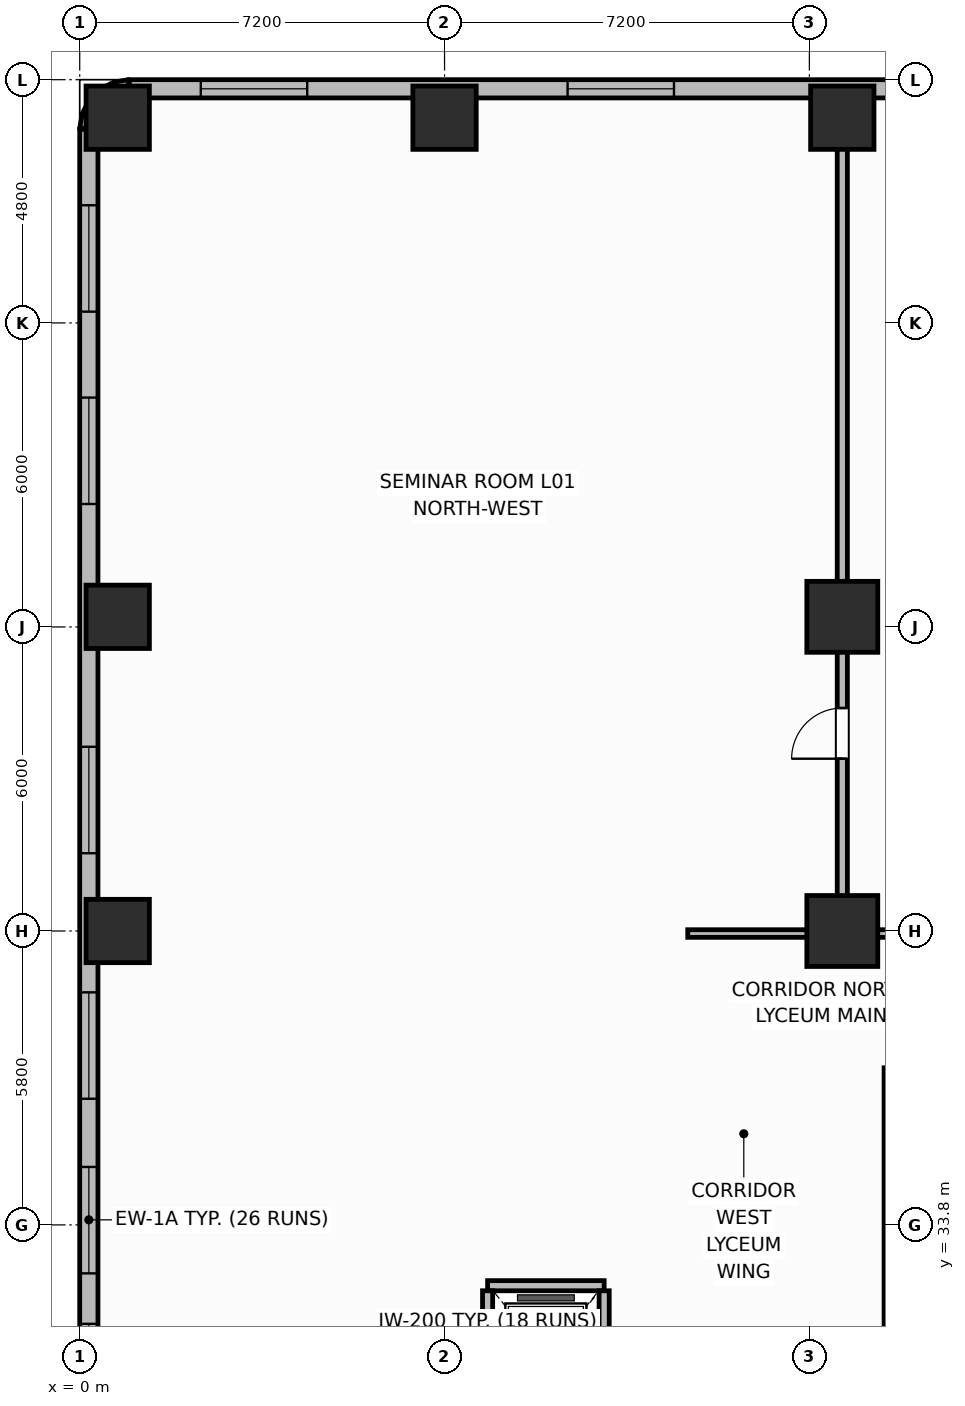
"""IFC4 building model, lengths in metres.
Left out: names, types, materials, properties, quantities, classifications, styles, units other than length and angle.
Written with IfcOpenShell. Run it as: python <this file> out.ifc"""

import sys

from ifc_helpers import new_model, si_unit, direction, frame, frame_2d, origin, origin_2d, place, context, subcontext, project, spatial, rectangle, extrude, element, fill, save


model = new_model("IFC4")
c1 = context("Model", 3, precision=1e-05, world=origin(), true_north=direction((0.0, 1.0)))
c2 = subcontext(c1, "Body", "Model", "MODEL_VIEW")
j1 = project(units=[si_unit("LENGTHUNIT", "METRE"), si_unit("PLANEANGLEUNIT", "RADIAN")], contexts=[c1])
p1 = place(None, origin())
s1 = spatial("IfcSite", under=j1, at=p1, CompositionType="ELEMENT")
p2 = place(p1, origin())
s2 = spatial("IfcBuilding", under=s1, at=p2, CompositionType="ELEMENT")
p3 = place(p2, frame((0.0, 0.0, 6.6)))
s3 = spatial("IfcBuildingStorey", under=s2, at=p3, CompositionType="ELEMENT", Elevation=6.6)
for number, where, z_axis, x_axis in (
    (1, (0.75, 39.6, 0.0), (0.0, 0.0, 1.0), (1.0, 0.0, 0.0)),
    (2, (0.75, 45.8, 0.0), (0.0, 0.0, 1.0), (1.0, 0.0, 0.0)),
    (3, (0.75, 55.65, 0.0), (0.0, 0.0, 1.0), (1.0, 0.0, 0.0)),
    (4, (7.2, 55.65, 0.0), (0.0, 0.0, 1.0), (1.0, 0.0, 0.0)),
    (5, (15.05, 55.65, 0.0), (0.0, 0.0, 1.0), (1.0, 0.0, 0.0)),
):
    element("IfcColumn", number, at=place(p3, frame(where, z_axis=z_axis, x_axis=x_axis)), inside=s3, PredefinedType="COLUMN", context=c2, shape_type="SweptSolid", body=[
        extrude(rectangle(XDim=1.25, YDim=1.25, at=origin_2d()), origin(), (0.0, 0.0, 1.0), 4.5),
    ])
for number, where, z_axis, x_axis in (
    (6, (15.05, 39.6, 0.0), (0.0, 0.0, 1.0), (1.0, 0.0, 0.0)),
    (7, (15.05, 45.8, 0.0), (0.0, 0.0, 1.0), (1.0, 0.0, 0.0)),
):
    element("IfcColumn", number, at=place(p3, frame(where, z_axis=z_axis, x_axis=x_axis)), inside=s3, PredefinedType="COLUMN", context=c2, shape_type="SweptSolid", body=[
        extrude(rectangle(XDim=1.4, YDim=1.4, at=origin_2d()), origin(), (0.0, 0.0, 1.0), 4.5),
    ])
p4 = place(p3, frame((56.57, 56.22, 0.0), z_axis=(0.0, 0.0, 1.0), x_axis=(-1.0, 0.0, 0.0)))
e8 = element("IfcWall", 8, at=p4, inside=s3, PredefinedType="SOLIDWALL", context=c2, shape_type="SweptSolid", body=[
    extrude(rectangle(XDim=55.59, YDim=0.36, at=frame_2d((27.795, 0.0))), origin(), (0.0, 0.0, 1.0), 3.48),
])
p5 = place(p4, frame((5.029, 0.0, 0.85)))
e9 = element("IfcOpeningElement", 9, at=p5, cuts=e8, PredefinedType="OPENING", context=c2, shape_type="SweptSolid", body=[
    extrude(rectangle(XDim=2.1, YDim=2.2, at=frame_2d((1.05, 1.1))), frame((0.0, 0.19, 0.0), z_axis=(0.0, -1.0, 0.0), x_axis=(1.0, 0.0, 0.0)), (0.0, 0.0, 1.0), 0.38),
])
p6 = place(p4, frame((8.648, 0.0, 0.85)))
e10 = element("IfcOpeningElement", 10, at=p6, cuts=e8, PredefinedType="OPENING", context=c2, shape_type="SweptSolid", body=[
    extrude(rectangle(XDim=2.1, YDim=2.2, at=frame_2d((1.05, 1.1))), frame((0.0, 0.19, 0.0), z_axis=(0.0, -1.0, 0.0), x_axis=(1.0, 0.0, 0.0)), (0.0, 0.0, 1.0), 0.38),
])
p7 = place(p4, frame((12.268, 0.0, 0.85)))
e11 = element("IfcOpeningElement", 11, at=p7, cuts=e8, PredefinedType="OPENING", context=c2, shape_type="SweptSolid", body=[
    extrude(rectangle(XDim=2.1, YDim=2.2, at=frame_2d((1.05, 1.1))), frame((0.0, 0.19, 0.0), z_axis=(0.0, -1.0, 0.0), x_axis=(1.0, 0.0, 0.0)), (0.0, 0.0, 1.0), 0.38),
])
p8 = place(p4, frame((19.506, 0.0, 0.85)))
e12 = element("IfcOpeningElement", 12, at=p8, cuts=e8, PredefinedType="OPENING", context=c2, shape_type="SweptSolid", body=[
    extrude(rectangle(XDim=2.1, YDim=2.2, at=frame_2d((1.05, 1.1))), frame((0.0, 0.19, 0.0), z_axis=(0.0, -1.0, 0.0), x_axis=(1.0, 0.0, 0.0)), (0.0, 0.0, 1.0), 0.38),
])
p9 = place(p4, frame((23.126, 0.0, 0.85)))
e13 = element("IfcOpeningElement", 13, at=p9, cuts=e8, PredefinedType="OPENING", context=c2, shape_type="SweptSolid", body=[
    extrude(rectangle(XDim=2.1, YDim=2.2, at=frame_2d((1.05, 1.1))), frame((0.0, 0.19, 0.0), z_axis=(0.0, -1.0, 0.0), x_axis=(1.0, 0.0, 0.0)), (0.0, 0.0, 1.0), 0.38),
])
p10 = place(p4, frame((26.745, 0.0, 0.85)))
e14 = element("IfcOpeningElement", 14, at=p10, cuts=e8, PredefinedType="OPENING", context=c2, shape_type="SweptSolid", body=[
    extrude(rectangle(XDim=2.1, YDim=2.2, at=frame_2d((1.05, 1.1))), frame((0.0, 0.19, 0.0), z_axis=(0.0, -1.0, 0.0), x_axis=(1.0, 0.0, 0.0)), (0.0, 0.0, 1.0), 0.38),
])
p11 = place(p4, frame((33.984, 0.0, 0.85)))
e15 = element("IfcOpeningElement", 15, at=p11, cuts=e8, PredefinedType="OPENING", context=c2, shape_type="SweptSolid", body=[
    extrude(rectangle(XDim=2.1, YDim=2.2, at=frame_2d((1.05, 1.1))), frame((0.0, 0.19, 0.0), z_axis=(0.0, -1.0, 0.0), x_axis=(1.0, 0.0, 0.0)), (0.0, 0.0, 1.0), 0.38),
])
p12 = place(p4, frame((37.603, 0.0, 0.85)))
e16 = element("IfcOpeningElement", 16, at=p12, cuts=e8, PredefinedType="OPENING", context=c2, shape_type="SweptSolid", body=[
    extrude(rectangle(XDim=2.1, YDim=2.2, at=frame_2d((1.05, 1.1))), frame((0.0, 0.19, 0.0), z_axis=(0.0, -1.0, 0.0), x_axis=(1.0, 0.0, 0.0)), (0.0, 0.0, 1.0), 0.38),
])
p13 = place(p4, frame((44.842, 0.0, 0.85)))
e17 = element("IfcOpeningElement", 17, at=p13, cuts=e8, PredefinedType="OPENING", context=c2, shape_type="SweptSolid", body=[
    extrude(rectangle(XDim=2.1, YDim=2.2, at=frame_2d((1.05, 1.1))), frame((0.0, 0.19, 0.0), z_axis=(0.0, -1.0, 0.0), x_axis=(1.0, 0.0, 0.0)), (0.0, 0.0, 1.0), 0.38),
])
p14 = place(p4, frame((52.08, 0.0, 0.85)))
e18 = element("IfcOpeningElement", 18, at=p14, cuts=e8, PredefinedType="OPENING", context=c2, shape_type="SweptSolid", body=[
    extrude(rectangle(XDim=2.1, YDim=2.2, at=frame_2d((1.05, 1.1))), frame((0.0, 0.19, 0.0), z_axis=(0.0, -1.0, 0.0), x_axis=(1.0, 0.0, 0.0)), (0.0, 0.0, 1.0), 0.38),
])
p15 = place(p3, frame((0.98, 56.22, 0.0), z_axis=(0.0, 0.0, 1.0), x_axis=(-0.987731290312, -0.156163049852, 0.0)))
e19 = element("IfcWall", 19, at=p15, inside=s3, PredefinedType="SOLIDWALL", context=c2, shape_type="SweptSolid", body=[
    extrude(rectangle(XDim=0.25, YDim=0.36, at=frame_2d((0.125, 0.0))), origin(), (0.0, 0.0, 1.0), 3.48),
])
p16 = place(p3, frame((0.733, 56.181, 0.0), z_axis=(0.0, 0.0, 1.0), x_axis=(-0.89089067942, -0.454217786225, 0.0)))
e20 = element("IfcWall", 20, at=p16, inside=s3, PredefinedType="SOLIDWALL", context=c2, shape_type="SweptSolid", body=[
    extrude(rectangle(XDim=0.25, YDim=0.36, at=frame_2d((0.125, 0.0))), origin(), (0.0, 0.0, 1.0), 3.48),
])
for number, where, z_axis, x_axis in (
    (21, (0.51, 56.067, 0.0), (0.0, 0.0, 1.0), (-0.707, -0.707, 0.0)),
    (22, (0.333, 55.89, 0.0), (0.0, 0.0, 1.0), (-0.454, -0.891, 0.0)),
):
    element("IfcWall", number, at=place(p3, frame(where, z_axis=z_axis, x_axis=x_axis)), inside=s3, PredefinedType="SOLIDWALL", context=c2, shape_type="SweptSolid", body=[
        extrude(rectangle(XDim=0.25, YDim=0.36, at=frame_2d((0.125, 0.0))), origin(), (0.0, 0.0, 1.0), 3.48),
    ])
p17 = place(p3, frame((0.219, 55.667, 0.0), z_axis=(0.0, 0.0, 1.0), x_axis=(-0.156963773077, -0.987604361038, 0.0)))
e23 = element("IfcWall", 23, at=p17, inside=s3, PredefinedType="SOLIDWALL", context=c2, shape_type="SweptSolid", body=[
    extrude(rectangle(XDim=0.25, YDim=0.36, at=frame_2d((0.125, 0.0))), origin(), (0.0, 0.0, 1.0), 3.48),
])
p18 = place(p3, frame((0.18, 55.42, 0.0), z_axis=(0.0, 0.0, 1.0), x_axis=(0.0, -1.0, 0.0)))
e24 = element("IfcWall", 24, at=p18, inside=s3, PredefinedType="SOLIDWALL", context=c2, shape_type="SweptSolid", body=[
    extrude(rectangle(XDim=54.44, YDim=0.36, at=frame_2d((27.22, 0.0))), origin(), (0.0, 0.0, 1.0), 3.48),
])
p19 = place(p18, frame((1.498, 0.0, 0.85)))
e25 = element("IfcOpeningElement", 25, at=p19, cuts=e24, PredefinedType="OPENING", context=c2, shape_type="SweptSolid", body=[
    extrude(rectangle(XDim=2.1, YDim=2.2, at=frame_2d((1.05, 1.1))), frame((0.0, 0.19, 0.0), z_axis=(0.0, -1.0, 0.0), x_axis=(1.0, 0.0, 0.0)), (0.0, 0.0, 1.0), 0.38),
])
p20 = place(p18, frame((5.294, 0.0, 0.85)))
e26 = element("IfcOpeningElement", 26, at=p20, cuts=e24, PredefinedType="OPENING", context=c2, shape_type="SweptSolid", body=[
    extrude(rectangle(XDim=2.1, YDim=2.2, at=frame_2d((1.05, 1.1))), frame((0.0, 0.19, 0.0), z_axis=(0.0, -1.0, 0.0), x_axis=(1.0, 0.0, 0.0)), (0.0, 0.0, 1.0), 0.38),
])
p21 = place(p18, frame((12.185, 0.0, 0.85)))
e27 = element("IfcOpeningElement", 27, at=p21, cuts=e24, PredefinedType="OPENING", context=c2, shape_type="SweptSolid", body=[
    extrude(rectangle(XDim=2.1, YDim=2.2, at=frame_2d((1.05, 1.1))), frame((0.0, 0.19, 0.0), z_axis=(0.0, -1.0, 0.0), x_axis=(1.0, 0.0, 0.0)), (0.0, 0.0, 1.0), 0.38),
])
p22 = place(p18, frame((17.031, 0.0, 0.85)))
e28 = element("IfcOpeningElement", 28, at=p22, cuts=e24, PredefinedType="OPENING", context=c2, shape_type="SweptSolid", body=[
    extrude(rectangle(XDim=2.1, YDim=2.2, at=frame_2d((1.05, 1.1))), frame((0.0, 0.19, 0.0), z_axis=(0.0, -1.0, 0.0), x_axis=(1.0, 0.0, 0.0)), (0.0, 0.0, 1.0), 0.38),
])
p23 = place(p18, frame((20.476, 0.0, 0.85)))
e29 = element("IfcOpeningElement", 29, at=p23, cuts=e24, PredefinedType="OPENING", context=c2, shape_type="SweptSolid", body=[
    extrude(rectangle(XDim=2.1, YDim=2.2, at=frame_2d((1.05, 1.1))), frame((0.0, 0.19, 0.0), z_axis=(0.0, -1.0, 0.0), x_axis=(1.0, 0.0, 0.0)), (0.0, 0.0, 1.0), 0.38),
])
p24 = place(p18, frame((23.572, 0.0, 0.85)))
e30 = element("IfcOpeningElement", 30, at=p24, cuts=e24, PredefinedType="OPENING", context=c2, shape_type="SweptSolid", body=[
    extrude(rectangle(XDim=2.1, YDim=2.2, at=frame_2d((1.05, 1.1))), frame((0.0, 0.19, 0.0), z_axis=(0.0, -1.0, 0.0), x_axis=(1.0, 0.0, 0.0)), (0.0, 0.0, 1.0), 0.38),
])
p25 = place(p18, frame((28.768, 0.0, 0.85)))
e31 = element("IfcOpeningElement", 31, at=p25, cuts=e24, PredefinedType="OPENING", context=c2, shape_type="SweptSolid", body=[
    extrude(rectangle(XDim=2.1, YDim=2.2, at=frame_2d((1.05, 1.1))), frame((0.0, 0.19, 0.0), z_axis=(0.0, -1.0, 0.0), x_axis=(1.0, 0.0, 0.0)), (0.0, 0.0, 1.0), 0.38),
])
p26 = place(p18, frame((31.864, 0.0, 0.85)))
e32 = element("IfcOpeningElement", 32, at=p26, cuts=e24, PredefinedType="OPENING", context=c2, shape_type="SweptSolid", body=[
    extrude(rectangle(XDim=2.1, YDim=2.2, at=frame_2d((1.05, 1.1))), frame((0.0, 0.19, 0.0), z_axis=(0.0, -1.0, 0.0), x_axis=(1.0, 0.0, 0.0)), (0.0, 0.0, 1.0), 0.38),
])
p27 = place(p18, frame((35.309, 0.0, 0.85)))
e33 = element("IfcOpeningElement", 33, at=p27, cuts=e24, PredefinedType="OPENING", context=c2, shape_type="SweptSolid", body=[
    extrude(rectangle(XDim=2.1, YDim=2.2, at=frame_2d((1.05, 1.1))), frame((0.0, 0.19, 0.0), z_axis=(0.0, -1.0, 0.0), x_axis=(1.0, 0.0, 0.0)), (0.0, 0.0, 1.0), 0.38),
])
p28 = place(p18, frame((40.155, 0.0, 0.85)))
e34 = element("IfcOpeningElement", 34, at=p28, cuts=e24, PredefinedType="OPENING", context=c2, shape_type="SweptSolid", body=[
    extrude(rectangle(XDim=2.1, YDim=2.2, at=frame_2d((1.05, 1.1))), frame((0.0, 0.19, 0.0), z_axis=(0.0, -1.0, 0.0), x_axis=(1.0, 0.0, 0.0)), (0.0, 0.0, 1.0), 0.38),
])
p29 = place(p18, frame((47.046, 0.0, 0.85)))
e35 = element("IfcOpeningElement", 35, at=p29, cuts=e24, PredefinedType="OPENING", context=c2, shape_type="SweptSolid", body=[
    extrude(rectangle(XDim=2.1, YDim=2.2, at=frame_2d((1.05, 1.1))), frame((0.0, 0.19, 0.0), z_axis=(0.0, -1.0, 0.0), x_axis=(1.0, 0.0, 0.0)), (0.0, 0.0, 1.0), 0.38),
])
p30 = place(p18, frame((50.842, 0.0, 0.85)))
e36 = element("IfcOpeningElement", 36, at=p30, cuts=e24, PredefinedType="OPENING", context=c2, shape_type="SweptSolid", body=[
    extrude(rectangle(XDim=2.1, YDim=2.2, at=frame_2d((1.05, 1.1))), frame((0.0, 0.19, 0.0), z_axis=(0.0, -1.0, 0.0), x_axis=(1.0, 0.0, 0.0)), (0.0, 0.0, 1.0), 0.38),
])
p31 = place(p3, frame((8.05, 32.6, 0.0), z_axis=(0.0, 0.0, 1.0), x_axis=(1.0, 0.0, 0.0)))
e37 = element("IfcWall", 37, at=p31, inside=s3, PredefinedType="PARTITIONING", context=c2, shape_type="SweptSolid", body=[
    extrude(rectangle(XDim=2.3, YDim=0.2, at=frame_2d((1.15, 0.0))), origin(), (0.0, 0.0, 1.0), 3.42),
])
for number, where, z_axis, x_axis in (
    (38, (8.05, 29.9, 0.0), (0.0, 0.0, 1.0), (0.0, 1.0, 0.0)),
    (39, (10.35, 29.9, 0.0), (0.0, 0.0, 1.0), (0.0, 1.0, 0.0)),
):
    element("IfcWall", number, at=place(p3, frame(where, z_axis=z_axis, x_axis=x_axis)), inside=s3, PredefinedType="PARTITIONING", context=c2, shape_type="SweptSolid", body=[
        extrude(rectangle(XDim=2.6, YDim=0.2, at=frame_2d((1.3, 0.0))), origin(), (0.0, 0.0, 1.0), 3.42),
    ])
p32 = place(p3, frame((15.95, 19.5, 0.0), z_axis=(0.0, 0.0, 1.0), x_axis=(0.0, 1.0, 0.0)))
e40 = element("IfcWall", 40, at=p32, inside=s3, PredefinedType="PARTITIONING", context=c2, shape_type="SweptSolid", body=[
    extrude(rectangle(XDim=17.4, YDim=0.15, at=frame_2d((8.7, 0.0))), origin(), (0.0, 0.0, 1.0), 3.42),
])
p33 = place(p3, frame((15.05, 39.6, 0.0), z_axis=(0.0, 0.0, 1.0), x_axis=(0.0, 1.0, 0.0)))
e41 = element("IfcWall", 41, at=p33, inside=s3, PredefinedType="PARTITIONING", context=c2, shape_type="SweptSolid", body=[
    extrude(rectangle(XDim=16.4, YDim=0.2, at=frame_2d((8.2, 0.0))), origin(), (0.0, 0.0, 1.0), 3.42),
])
p34 = place(p33, frame((3.4, 0.0, 0.0)))
e42 = element("IfcOpeningElement", 42, at=p34, cuts=e41, PredefinedType="OPENING", context=c2, shape_type="SweptSolid", body=[
    extrude(rectangle(XDim=1.0, YDim=2.15, at=frame_2d((0.5, 1.075))), frame((0.0, 0.11, 0.0), z_axis=(0.0, -1.0, 0.0), x_axis=(1.0, 0.0, 0.0)), (0.0, 0.0, 1.0), 0.22),
])
p35 = place(p3, frame((25.25, 39.55, 0.0), z_axis=(0.0, 0.0, 1.0), x_axis=(-1.0, 0.0, 0.0)))
e43 = element("IfcWall", 43, at=p35, inside=s3, PredefinedType="PARTITIONING", context=c2, shape_type="SweptSolid", body=[
    extrude(rectangle(XDim=13.25, YDim=0.15, at=frame_2d((6.625, 0.0))), origin(), (0.0, 0.0, 1.0), 3.42),
])
p36 = place(p35, frame((4.2, 0.0, 0.0)))
e44 = element("IfcOpeningElement", 44, at=p36, cuts=e43, PredefinedType="OPENING", context=c2, shape_type="SweptSolid", body=[
    extrude(rectangle(XDim=1.0, YDim=2.15, at=frame_2d((0.5, 1.075))), frame((0.0, 0.085, 0.0), z_axis=(0.0, -1.0, 0.0), x_axis=(1.0, 0.0, 0.0)), (0.0, 0.0, 1.0), 0.17),
])
p37 = place(p13, origin())
e45 = element("IfcWindow", 45, at=p37, inside=s3, PartitioningType="SINGLE_PANEL", PredefinedType="WINDOW", context=c2, shape_type="SweptSolid", body=[
    extrude(rectangle(XDim=2.1, YDim=2.2, at=frame_2d((1.05, 1.1))), frame((0.0, 0.03, 0.0), z_axis=(0.0, -1.0, 0.0), x_axis=(1.0, 0.0, 0.0)), (0.0, 0.0, 1.0), 0.06),
])
fill(e17, e45)
p38 = place(p14, origin())
e46 = element("IfcWindow", 46, at=p38, inside=s3, PartitioningType="SINGLE_PANEL", PredefinedType="WINDOW", context=c2, shape_type="SweptSolid", body=[
    extrude(rectangle(XDim=2.1, YDim=2.2, at=frame_2d((1.05, 1.1))), frame((0.0, 0.03, 0.0), z_axis=(0.0, -1.0, 0.0), x_axis=(1.0, 0.0, 0.0)), (0.0, 0.0, 1.0), 0.06),
])
fill(e18, e46)
p39 = place(p19, origin())
e47 = element("IfcWindow", 47, at=p39, inside=s3, PartitioningType="SINGLE_PANEL", PredefinedType="WINDOW", context=c2, shape_type="SweptSolid", body=[
    extrude(rectangle(XDim=2.1, YDim=2.2, at=frame_2d((1.05, 1.1))), frame((0.0, 0.03, 0.0), z_axis=(0.0, -1.0, 0.0), x_axis=(1.0, 0.0, 0.0)), (0.0, 0.0, 1.0), 0.06),
])
fill(e25, e47)
p40 = place(p20, origin())
e48 = element("IfcWindow", 48, at=p40, inside=s3, PartitioningType="SINGLE_PANEL", PredefinedType="WINDOW", context=c2, shape_type="SweptSolid", body=[
    extrude(rectangle(XDim=2.1, YDim=2.2, at=frame_2d((1.05, 1.1))), frame((0.0, 0.03, 0.0), z_axis=(0.0, -1.0, 0.0), x_axis=(1.0, 0.0, 0.0)), (0.0, 0.0, 1.0), 0.06),
])
fill(e26, e48)
p41 = place(p21, origin())
e49 = element("IfcWindow", 49, at=p41, inside=s3, PartitioningType="SINGLE_PANEL", PredefinedType="WINDOW", context=c2, shape_type="SweptSolid", body=[
    extrude(rectangle(XDim=2.1, YDim=2.2, at=frame_2d((1.05, 1.1))), frame((0.0, 0.03, 0.0), z_axis=(0.0, -1.0, 0.0), x_axis=(1.0, 0.0, 0.0)), (0.0, 0.0, 1.0), 0.06),
])
fill(e27, e49)
p42 = place(p22, origin())
e50 = element("IfcWindow", 50, at=p42, inside=s3, PartitioningType="SINGLE_PANEL", PredefinedType="WINDOW", context=c2, shape_type="SweptSolid", body=[
    extrude(rectangle(XDim=2.1, YDim=2.2, at=frame_2d((1.05, 1.1))), frame((0.0, 0.03, 0.0), z_axis=(0.0, -1.0, 0.0), x_axis=(1.0, 0.0, 0.0)), (0.0, 0.0, 1.0), 0.06),
])
fill(e28, e50)
p43 = place(p23, origin())
e51 = element("IfcWindow", 51, at=p43, inside=s3, PartitioningType="SINGLE_PANEL", PredefinedType="WINDOW", context=c2, shape_type="SweptSolid", body=[
    extrude(rectangle(XDim=2.1, YDim=2.2, at=frame_2d((1.05, 1.1))), frame((0.0, 0.03, 0.0), z_axis=(0.0, -1.0, 0.0), x_axis=(1.0, 0.0, 0.0)), (0.0, 0.0, 1.0), 0.06),
])
fill(e29, e51)
p44 = place(p24, origin())
e52 = element("IfcWindow", 52, at=p44, inside=s3, PartitioningType="SINGLE_PANEL", PredefinedType="WINDOW", context=c2, shape_type="SweptSolid", body=[
    extrude(rectangle(XDim=2.1, YDim=2.2, at=frame_2d((1.05, 1.1))), frame((0.0, 0.03, 0.0), z_axis=(0.0, -1.0, 0.0), x_axis=(1.0, 0.0, 0.0)), (0.0, 0.0, 1.0), 0.06),
])
fill(e30, e52)
p45 = place(p34, origin())
e53 = element("IfcDoor", 53, at=p45, inside=s3, OperationType="SINGLE_SWING_LEFT", PredefinedType="DOOR", context=c2, shape_type="SweptSolid", body=[
    extrude(rectangle(XDim=1.0, YDim=2.15, at=frame_2d((0.5, 1.075))), frame((0.0, 0.025, 0.0), z_axis=(0.0, -1.0, 0.0), x_axis=(1.0, 0.0, 0.0)), (0.0, 0.0, 1.0), 0.05),
])
fill(e42, e53)
save(model, sys.argv[1])
